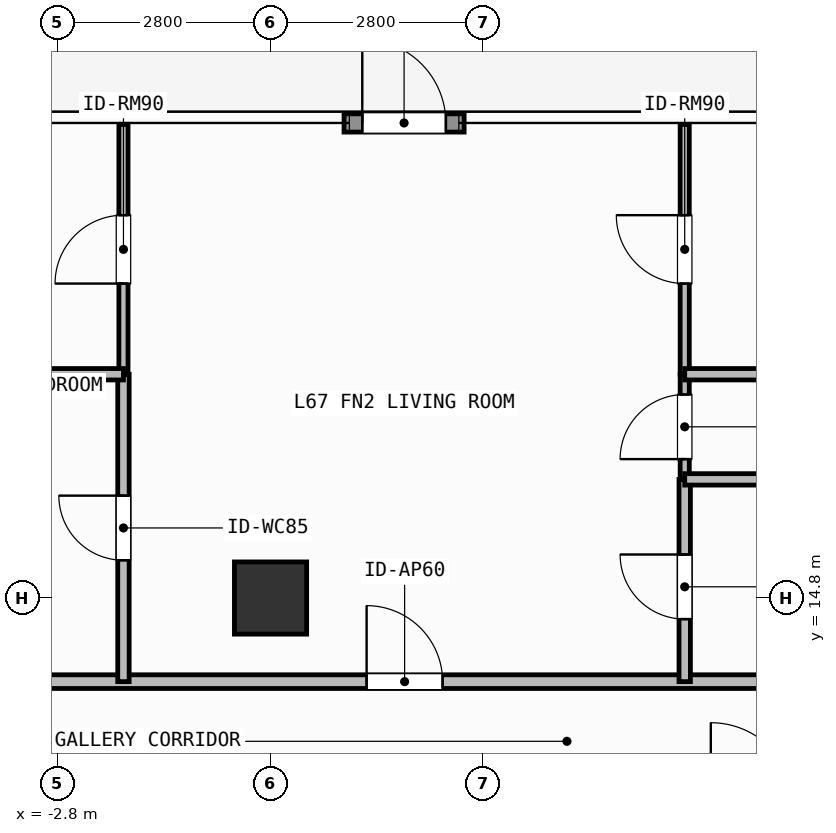
"""IFC4 building model, lengths in metres.
Left out: names, types, materials, properties, quantities, classifications, styles, units other than length and angle.
Written with IfcOpenShell. Run it as: python <this file> out.ifc"""

import sys

from ifc_helpers import new_model, si_unit, direction, frame, frame_2d, origin, origin_2d, place, context, subcontext, project, spatial, rectangle, extrude, element, fill, save


model = new_model("IFC4")
c1 = context("Model", 3, precision=1e-05, world=origin(), true_north=direction((0.0, 1.0)))
c2 = subcontext(c1, "Body", "Model", "MODEL_VIEW")
j1 = project(units=[si_unit("LENGTHUNIT", "METRE"), si_unit("PLANEANGLEUNIT", "RADIAN")], contexts=[c1])
p1 = place(None, origin())
s1 = spatial("IfcSite", under=j1, at=p1, CompositionType="ELEMENT")
p2 = place(p1, origin())
s2 = spatial("IfcBuilding", under=s1, at=p2, CompositionType="ELEMENT")
p3 = place(p2, frame((0.0, 0.0, 274.2)))
s3 = spatial("IfcBuildingStorey", under=s2, at=p3, CompositionType="ELEMENT", Elevation=274.2)
p4 = place(p3, frame((0.0, 14.8, 0.0), z_axis=(0.0, 0.0, 1.0), x_axis=(1.0, 0.0, 0.0)))
e1 = element("IfcColumn", 1, at=p4, inside=s3, PredefinedType="COLUMN", context=c2, shape_type="SweptSolid", body=[
    extrude(rectangle(XDim=0.95, YDim=0.95, at=origin_2d()), origin(), (0.0, 0.0, 1.0), 3.9),
])
p5 = place(p3, frame((0.967, 21.05, 0.0), z_axis=(0.0, 0.0, 1.0), x_axis=(1.0, 0.0, 0.0)))
e2 = element("IfcWall", 2, at=p5, inside=s3, PredefinedType="SOLIDWALL", context=c2, shape_type="SweptSolid", body=[
    extrude(rectangle(XDim=1.58, YDim=0.24, at=frame_2d((0.79, 0.0))), origin(), (0.0, 0.0, 1.0), 3.68),
])
p6 = place(p5, frame((0.24, 0.0, 0.0)))
e3 = element("IfcOpeningElement", 3, at=p6, cuts=e2, PredefinedType="OPENING", context=c2, shape_type="SweptSolid", body=[
    extrude(rectangle(XDim=1.1, YDim=2.2, at=frame_2d((0.55, 1.1))), frame((0.0, 0.13, 0.0), z_axis=(0.0, -1.0, 0.0), x_axis=(1.0, 0.0, 0.0)), (0.0, 0.0, 1.0), 0.26),
])
p7 = place(p3, frame((-5.85, 13.7, 0.0), z_axis=(0.0, 0.0, 1.0), x_axis=(1.0, 0.0, 0.0)))
e4 = element("IfcWall", 4, at=p7, inside=s3, PredefinedType="PARTITIONING", context=c2, shape_type="SweptSolid", body=[
    extrude(rectangle(XDim=17.368, YDim=0.18, at=frame_2d((8.684, 0.0))), origin(), (0.0, 0.0, 1.0), 3.68),
])
p8 = place(p7, frame((7.114, 0.0, 0.0)))
e5 = element("IfcOpeningElement", 5, at=p8, cuts=e4, PredefinedType="OPENING", context=c2, shape_type="SweptSolid", body=[
    extrude(rectangle(XDim=1.0, YDim=2.2, at=frame_2d((0.5, 1.1))), frame((0.0, 0.1, 0.0), z_axis=(0.0, -1.0, 0.0), x_axis=(1.0, 0.0, 0.0)), (0.0, 0.0, 1.0), 0.2),
])
p9 = place(p3, frame((-1.935, 13.7, 0.0), z_axis=(0.0, 0.0, 1.0), x_axis=(0.0, 1.0, 0.0)))
e6 = element("IfcWall", 6, at=p9, inside=s3, PredefinedType="PARTITIONING", context=c2, shape_type="SweptSolid", body=[
    extrude(rectangle(XDim=4.044, YDim=0.15, at=frame_2d((2.022, 0.0))), origin(), (0.0, 0.0, 1.0), 3.68),
])
p10 = place(p9, frame((1.597, 0.0, 0.0)))
e7 = element("IfcOpeningElement", 7, at=p10, cuts=e6, PredefinedType="OPENING", context=c2, shape_type="SweptSolid", body=[
    extrude(rectangle(XDim=0.85, YDim=2.1, at=frame_2d((0.425, 1.05))), frame((0.0, 0.085, 0.0), z_axis=(0.0, -1.0, 0.0), x_axis=(1.0, 0.0, 0.0)), (0.0, 0.0, 1.0), 0.17),
])
p11 = place(p3, frame((-1.935, 17.744, 0.0), z_axis=(0.0, 0.0, 1.0), x_axis=(0.0, 1.0, 0.0)))
e8 = element("IfcWall", 8, at=p11, inside=s3, PredefinedType="PARTITIONING", context=c2, shape_type="SweptSolid", body=[
    extrude(rectangle(XDim=3.286, YDim=0.12, at=frame_2d((1.643, 0.0))), origin(), (0.0, 0.0, 1.0), 3.68),
])
p12 = place(p11, frame((1.193, 0.0, 0.0)))
e9 = element("IfcOpeningElement", 9, at=p12, cuts=e8, PredefinedType="OPENING", context=c2, shape_type="SweptSolid", body=[
    extrude(rectangle(XDim=0.9, YDim=2.1, at=frame_2d((0.45, 1.05))), frame((0.0, 0.07, 0.0), z_axis=(0.0, -1.0, 0.0), x_axis=(1.0, 0.0, 0.0)), (0.0, 0.0, 1.0), 0.14),
])
p13 = place(p3, frame((5.449, 13.7, 0.0), z_axis=(0.0, 0.0, 1.0), x_axis=(0.0, 1.0, 0.0)))
e10 = element("IfcWall", 10, at=p13, inside=s3, PredefinedType="PARTITIONING", context=c2, shape_type="SweptSolid", body=[
    extrude(rectangle(XDim=2.661, YDim=0.15, at=frame_2d((1.331, 0.0))), origin(), (0.0, 0.0, 1.0), 3.68),
])
p14 = place(p13, frame((0.823, 0.0, 0.0)))
e11 = element("IfcOpeningElement", 11, at=p14, cuts=e10, PredefinedType="OPENING", context=c2, shape_type="SweptSolid", body=[
    extrude(rectangle(XDim=0.85, YDim=2.1, at=frame_2d((0.425, 1.05))), frame((0.0, 0.085, 0.0), z_axis=(0.0, -1.0, 0.0), x_axis=(1.0, 0.0, 0.0)), (0.0, 0.0, 1.0), 0.17),
])
p15 = place(p3, frame((5.449, 16.361, 0.0), z_axis=(0.0, 0.0, 1.0), x_axis=(0.0, 1.0, 0.0)))
e12 = element("IfcWall", 12, at=p15, inside=s3, PredefinedType="PARTITIONING", context=c2, shape_type="SweptSolid", body=[
    extrude(rectangle(XDim=1.383, YDim=0.12, at=frame_2d((0.691, 0.0))), origin(), (0.0, 0.0, 1.0), 3.68),
])
p16 = place(p15, frame((0.267, 0.0, 0.0)))
e13 = element("IfcOpeningElement", 13, at=p16, cuts=e12, PredefinedType="OPENING", context=c2, shape_type="SweptSolid", body=[
    extrude(rectangle(XDim=0.85, YDim=2.1, at=frame_2d((0.425, 1.05))), frame((0.0, 0.07, 0.0), z_axis=(0.0, -1.0, 0.0), x_axis=(1.0, 0.0, 0.0)), (0.0, 0.0, 1.0), 0.14),
])
p17 = place(p3, frame((5.449, 17.744, 0.0), z_axis=(0.0, 0.0, 1.0), x_axis=(0.0, 1.0, 0.0)))
e14 = element("IfcWall", 14, at=p17, inside=s3, PredefinedType="PARTITIONING", context=c2, shape_type="SweptSolid", body=[
    extrude(rectangle(XDim=3.286, YDim=0.12, at=frame_2d((1.643, 0.0))), origin(), (0.0, 0.0, 1.0), 3.68),
])
p18 = place(p17, frame((1.193, 0.0, 0.0)))
e15 = element("IfcOpeningElement", 15, at=p18, cuts=e14, PredefinedType="OPENING", context=c2, shape_type="SweptSolid", body=[
    extrude(rectangle(XDim=0.9, YDim=2.1, at=frame_2d((0.45, 1.05))), frame((0.0, 0.07, 0.0), z_axis=(0.0, -1.0, 0.0), x_axis=(1.0, 0.0, 0.0)), (0.0, 0.0, 1.0), 0.14),
])
p19 = place(p3, frame((-5.85, 17.744, 0.0), z_axis=(0.0, 0.0, 1.0), x_axis=(1.0, 0.0, 0.0)))
e16 = element("IfcWall", 16, at=p19, inside=s3, PredefinedType="PARTITIONING", context=c2, shape_type="SweptSolid", body=[
    extrude(rectangle(XDim=3.915, YDim=0.15, at=frame_2d((1.958, 0.0))), origin(), (0.0, 0.0, 1.0), 3.68),
])
for number, where, z_axis, x_axis in (
    (17, (5.449, 16.361, 0.0), (0.0, 0.0, 1.0), (1.0, 0.0, 0.0)),
    (18, (5.449, 17.744, 0.0), (0.0, 0.0, 1.0), (1.0, 0.0, 0.0)),
):
    element("IfcWall", number, at=place(p3, frame(where, z_axis=z_axis, x_axis=x_axis)), inside=s3, PredefinedType="PARTITIONING", context=c2, shape_type="SweptSolid", body=[
        extrude(rectangle(XDim=6.069, YDim=0.15, at=frame_2d((3.035, 0.0))), origin(), (0.0, 0.0, 1.0), 3.68),
    ])
p20 = place(p6, origin())
e19 = element("IfcDoor", 19, at=p20, inside=s3, OperationType="SINGLE_SWING_LEFT", PredefinedType="DOOR", context=c2, shape_type="SweptSolid", body=[
    extrude(rectangle(XDim=1.1, YDim=2.2, at=frame_2d((0.55, 1.1))), frame((0.0, 0.025, 0.0), z_axis=(0.0, -1.0, 0.0), x_axis=(1.0, 0.0, 0.0)), (0.0, 0.0, 1.0), 0.05),
])
fill(e3, e19)
p21 = place(p8, origin())
e20 = element("IfcDoor", 20, at=p21, inside=s3, OperationType="SINGLE_SWING_LEFT", PredefinedType="DOOR", context=c2, shape_type="SweptSolid", body=[
    extrude(rectangle(XDim=1.0, YDim=2.2, at=frame_2d((0.5, 1.1))), frame((0.0, 0.025, 0.0), z_axis=(0.0, -1.0, 0.0), x_axis=(1.0, 0.0, 0.0)), (0.0, 0.0, 1.0), 0.05),
])
fill(e5, e20)
p22 = place(p10, origin())
e21 = element("IfcDoor", 21, at=p22, inside=s3, OperationType="SINGLE_SWING_RIGHT", PredefinedType="DOOR", context=c2, shape_type="SweptSolid", body=[
    extrude(rectangle(XDim=0.85, YDim=2.1, at=frame_2d((0.425, 1.05))), frame((0.0, 0.025, 0.0), z_axis=(0.0, -1.0, 0.0), x_axis=(1.0, 0.0, 0.0)), (0.0, 0.0, 1.0), 0.05),
])
fill(e7, e21)
p23 = place(p12, origin())
e22 = element("IfcDoor", 22, at=p23, inside=s3, OperationType="SINGLE_SWING_LEFT", PredefinedType="DOOR", context=c2, shape_type="SweptSolid", body=[
    extrude(rectangle(XDim=0.9, YDim=2.1, at=frame_2d((0.45, 1.05))), frame((0.0, 0.025, 0.0), z_axis=(0.0, -1.0, 0.0), x_axis=(1.0, 0.0, 0.0)), (0.0, 0.0, 1.0), 0.05),
])
fill(e9, e22)
p24 = place(p14, origin())
e23 = element("IfcDoor", 23, at=p24, inside=s3, OperationType="SINGLE_SWING_RIGHT", PredefinedType="DOOR", context=c2, shape_type="SweptSolid", body=[
    extrude(rectangle(XDim=0.85, YDim=2.1, at=frame_2d((0.425, 1.05))), frame((0.0, 0.025, 0.0), z_axis=(0.0, -1.0, 0.0), x_axis=(1.0, 0.0, 0.0)), (0.0, 0.0, 1.0), 0.05),
])
fill(e11, e23)
p25 = place(p16, origin())
e24 = element("IfcDoor", 24, at=p25, inside=s3, OperationType="SINGLE_SWING_LEFT", PredefinedType="DOOR", context=c2, shape_type="SweptSolid", body=[
    extrude(rectangle(XDim=0.85, YDim=2.1, at=frame_2d((0.425, 1.05))), frame((0.0, 0.025, 0.0), z_axis=(0.0, -1.0, 0.0), x_axis=(1.0, 0.0, 0.0)), (0.0, 0.0, 1.0), 0.05),
])
fill(e13, e24)
p26 = place(p18, origin())
e25 = element("IfcDoor", 25, at=p26, inside=s3, OperationType="SINGLE_SWING_RIGHT", PredefinedType="DOOR", context=c2, shape_type="SweptSolid", body=[
    extrude(rectangle(XDim=0.9, YDim=2.1, at=frame_2d((0.45, 1.05))), frame((0.0, 0.025, 0.0), z_axis=(0.0, -1.0, 0.0), x_axis=(1.0, 0.0, 0.0)), (0.0, 0.0, 1.0), 0.05),
])
fill(e15, e25)
save(model, sys.argv[1])
